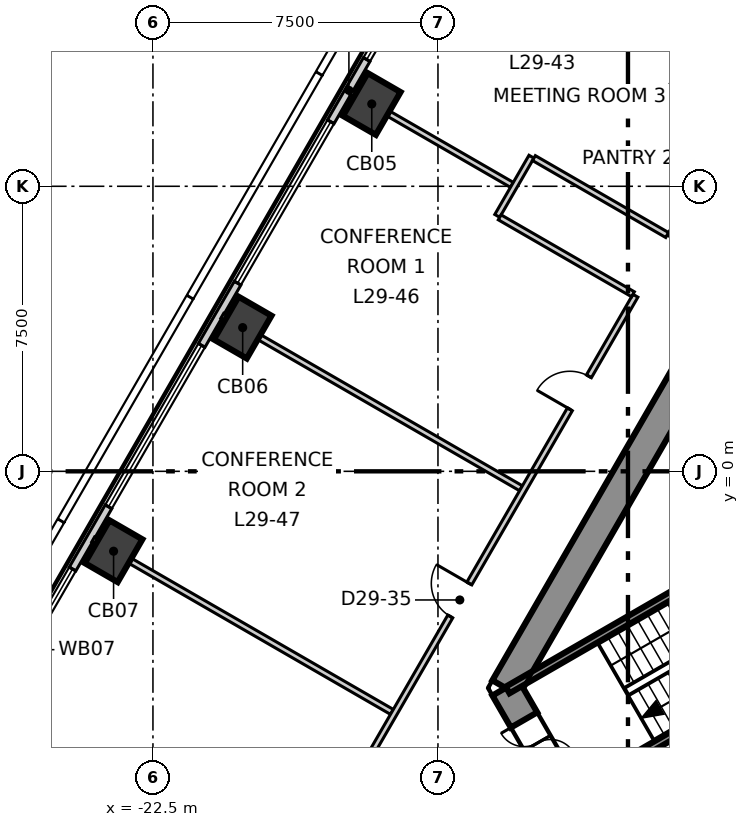
"""IFC4 building model, lengths in metres.
Left out: names, types, materials, properties, quantities, classifications, styles, units other than length and angle.
Written with IfcOpenShell. Run it as: python <this file> out.ifc"""

import sys

from ifc_helpers import new_model, si_unit, direction, frame, frame_2d, origin, origin_2d, place, context, subcontext, project, spatial, polyline, rectangle, outline, extrude, element, fill, save


model = new_model("IFC4")
c1 = context("Model", 3, precision=1e-05, world=origin(), true_north=direction((0.0, 1.0)))
c2 = subcontext(c1, "Body", "Model", "MODEL_VIEW")
j1 = project(units=[si_unit("LENGTHUNIT", "METRE"), si_unit("PLANEANGLEUNIT", "RADIAN")], contexts=[c1])
p1 = place(None, origin())
s1 = spatial("IfcSite", under=j1, at=p1, CompositionType="ELEMENT")
p2 = place(p1, origin())
s2 = spatial("IfcBuilding", under=s1, at=p2, CompositionType="ELEMENT")
p3 = place(p2, frame((0.0, 0.0, 128.3)))
s3 = spatial("IfcBuildingStorey", under=s2, at=p3, CompositionType="ELEMENT", Elevation=128.3)
p4 = place(p3, frame((-1.674, 14.3, -0.3), z_axis=(0.0, 0.0, 1.0), x_axis=(-0.499995765644, -0.866027848477, 0.0)))
e1 = element("IfcWall", 1, at=p4, inside=s3, PredefinedType="SHEAR", context=c2, shape_type="SweptSolid", body=[
    extrude(outline(polyline([(-0.231, -0.4), (1.732, -0.4), (3.695, -0.4), (5.658, -0.4), (7.621, -0.4), (9.584, -0.4), (11.547, -0.4), (13.51, -0.4), (15.473, -0.4), (17.436, -0.4), (19.399, -0.4), (21.362, -0.4), (23.325, -0.4), (22.863, 0.4), (20.977, 0.4), (19.091, 0.4), (17.205, 0.4), (15.319, 0.4), (13.433, 0.4), (11.547, 0.4), (9.661, 0.4), (7.775, 0.4), (5.889, 0.4), (4.003, 0.4), (2.117, 0.4), (0.231, 0.4), (-0.231, -0.4)])), origin(), (0.0, 0.0, 1.0), 4.0),
])
p5 = place(p4, frame((10.997, 0.0, 0.3)))
e2 = element("IfcOpeningElement", 2, at=p5, cuts=e1, PredefinedType="OPENING", context=c2, shape_type="SweptSolid", body=[
    extrude(rectangle(XDim=1.1, YDim=2.1, at=frame_2d((0.55, 1.05))), frame((0.0, 0.41, 0.0), z_axis=(0.0, -1.0, 0.0), x_axis=(1.0, 0.0, 0.0)), (0.0, 0.0, 1.0), 0.82),
])
p6 = place(p4, frame((5.444, 0.0, 0.3)))
e3 = element("IfcOpeningElement", 3, at=p6, cuts=e1, PredefinedType="OPENING", context=c2, shape_type="SweptSolid", body=[
    extrude(rectangle(XDim=0.9, YDim=2.1, at=frame_2d((0.45, 1.05))), frame((0.0, 0.41, 0.0), z_axis=(0.0, -1.0, 0.0), x_axis=(1.0, 0.0, 0.0)), (0.0, 0.0, 1.0), 0.82),
])
p7 = place(p3, frame((-13.221, -5.7, -0.3), z_axis=(0.0, 0.0, 1.0), x_axis=(0.49987182685, -0.866099391942, 0.0)))
e4 = element("IfcWall", 4, at=p7, inside=s3, PredefinedType="SHEAR", context=c2, shape_type="SweptSolid", body=[
    extrude(outline(polyline([(-0.231, -0.4), (1.674, -0.4), (3.579, -0.4), (3.118, 0.4), (1.674, 0.4), (0.231, 0.4), (-0.231, -0.4)])), origin(), (0.0, 0.0, 1.0), 4.0),
])
p8 = place(p7, frame((0.974, 0.0, 0.3)))
e5 = element("IfcOpeningElement", 5, at=p8, cuts=e4, PredefinedType="OPENING", context=c2, shape_type="SweptSolid", body=[
    extrude(rectangle(XDim=1.4, YDim=2.1, at=frame_2d((0.7, 1.05))), frame((0.0, 0.41, 0.0), z_axis=(0.0, -1.0, 0.0), x_axis=(1.0, 0.0, 0.0)), (0.0, 0.0, 1.0), 0.82),
])
for number, where, z_axis, x_axis in (
    (6, (-16.742, 9.666, -0.3), (0.0, 0.0, 1.0), (0.5, 0.866, 0.0)),
    (7, (-20.139, 3.782, -0.3), (0.0, 0.0, 1.0), (0.5, 0.866, 0.0)),
    (8, (-23.536, -2.102, -0.3), (0.0, 0.0, 1.0), (0.5, 0.866, 0.0)),
):
    element("IfcColumn", number, at=place(p3, frame(where, z_axis=z_axis, x_axis=x_axis)), inside=s3, PredefinedType="COLUMN", context=c2, shape_type="SweptSolid", body=[
        extrude(rectangle(XDim=1.3, YDim=1.0, at=origin_2d()), origin(), (0.0, 0.0, 1.0), 4.0),
    ])
p9 = place(p3, frame((-3.109, 34.679, 0.0), z_axis=(0.0, 0.0, 1.0), x_axis=(-0.50000689325, -0.866021423928, 0.0)))
e9 = element("IfcWall", 9, at=p9, inside=s3, PredefinedType="ELEMENTEDWALL", context=c2, shape_type="SweptSolid", body=[
    extrude(rectangle(XDim=56.937, YDim=0.2, at=frame_2d((28.469, 0.0))), origin(), (0.0, 0.0, 1.0), 3.7),
])
p10 = place(p9, frame((2.249, 0.0, 0.9)))
e10 = element("IfcOpeningElement", 10, at=p10, cuts=e9, PredefinedType="OPENING", context=c2, shape_type="SweptSolid", body=[
    extrude(rectangle(XDim=4.9, YDim=2.5, at=frame_2d((2.45, 1.25))), frame((0.0, 0.11, 0.0), z_axis=(0.0, -1.0, 0.0), x_axis=(1.0, 0.0, 0.0)), (0.0, 0.0, 1.0), 0.22),
])
p11 = place(p9, frame((9.043, 0.0, 0.9)))
e11 = element("IfcOpeningElement", 11, at=p11, cuts=e9, PredefinedType="OPENING", context=c2, shape_type="SweptSolid", body=[
    extrude(rectangle(XDim=4.9, YDim=2.5, at=frame_2d((2.45, 1.25))), frame((0.0, 0.11, 0.0), z_axis=(0.0, -1.0, 0.0), x_axis=(1.0, 0.0, 0.0)), (0.0, 0.0, 1.0), 0.22),
])
p12 = place(p9, frame((15.837, 0.0, 0.9)))
e12 = element("IfcOpeningElement", 12, at=p12, cuts=e9, PredefinedType="OPENING", context=c2, shape_type="SweptSolid", body=[
    extrude(rectangle(XDim=4.9, YDim=2.5, at=frame_2d((2.45, 1.25))), frame((0.0, 0.11, 0.0), z_axis=(0.0, -1.0, 0.0), x_axis=(1.0, 0.0, 0.0)), (0.0, 0.0, 1.0), 0.22),
])
p13 = place(p9, frame((22.631, 0.0, 0.9)))
e13 = element("IfcOpeningElement", 13, at=p13, cuts=e9, PredefinedType="OPENING", context=c2, shape_type="SweptSolid", body=[
    extrude(rectangle(XDim=4.9, YDim=2.5, at=frame_2d((2.45, 1.25))), frame((0.0, 0.11, 0.0), z_axis=(0.0, -1.0, 0.0), x_axis=(1.0, 0.0, 0.0)), (0.0, 0.0, 1.0), 0.22),
])
p14 = place(p9, frame((29.425, 0.0, 0.9)))
e14 = element("IfcOpeningElement", 14, at=p14, cuts=e9, PredefinedType="OPENING", context=c2, shape_type="SweptSolid", body=[
    extrude(rectangle(XDim=4.9, YDim=2.5, at=frame_2d((2.45, 1.25))), frame((0.0, 0.11, 0.0), z_axis=(0.0, -1.0, 0.0), x_axis=(1.0, 0.0, 0.0)), (0.0, 0.0, 1.0), 0.22),
])
p15 = place(p9, frame((36.219, 0.0, 0.9)))
e15 = element("IfcOpeningElement", 15, at=p15, cuts=e9, PredefinedType="OPENING", context=c2, shape_type="SweptSolid", body=[
    extrude(rectangle(XDim=4.9, YDim=2.5, at=frame_2d((2.45, 1.25))), frame((0.0, 0.11, 0.0), z_axis=(0.0, -1.0, 0.0), x_axis=(1.0, 0.0, 0.0)), (0.0, 0.0, 1.0), 0.22),
])
p16 = place(p9, frame((43.013, 0.0, 0.9)))
e16 = element("IfcOpeningElement", 16, at=p16, cuts=e9, PredefinedType="OPENING", context=c2, shape_type="SweptSolid", body=[
    extrude(rectangle(XDim=4.9, YDim=2.5, at=frame_2d((2.45, 1.25))), frame((0.0, 0.11, 0.0), z_axis=(0.0, -1.0, 0.0), x_axis=(1.0, 0.0, 0.0)), (0.0, 0.0, 1.0), 0.22),
])
p17 = place(p9, frame((49.807, 0.0, 0.9)))
e17 = element("IfcOpeningElement", 17, at=p17, cuts=e9, PredefinedType="OPENING", context=c2, shape_type="SweptSolid", body=[
    extrude(rectangle(XDim=4.9, YDim=2.5, at=frame_2d((2.45, 1.25))), frame((0.0, 0.11, 0.0), z_axis=(0.0, -1.0, 0.0), x_axis=(1.0, 0.0, 0.0)), (0.0, 0.0, 1.0), 0.22),
])
for number, where, z_axis, x_axis in (
    (18, (-24.073, -1.792, 0.0), (0.0, 0.0, 1.0), (0.866, -0.5, 0.0)),
    (19, (-20.676, 4.092, 0.0), (0.0, 0.0, 1.0), (0.866, -0.5, 0.0)),
):
    element("IfcWall", number, at=place(p3, frame(where, z_axis=z_axis, x_axis=x_axis)), inside=s3, PredefinedType="PARTITIONING", context=c2, shape_type="SweptSolid", body=[
        extrude(rectangle(XDim=9.077, YDim=0.15, at=frame_2d((4.539, 0.0))), origin(), (0.0, 0.0, 1.0), 3.7),
    ])
p18 = place(p3, frame((-18.631, -10.67, 0.0), z_axis=(0.0, 0.0, 1.0), x_axis=(0.499976222121, 0.866039131514, 0.0)))
e20 = element("IfcWall", 20, at=p18, inside=s3, PredefinedType="PARTITIONING", context=c2, shape_type="SweptSolid", body=[
    extrude(rectangle(XDim=17.655, YDim=0.15, at=frame_2d((8.828, 0.0))), origin(), (0.0, 0.0, 1.0), 3.7),
])
p19 = place(p18, frame((14.206, 0.0, 0.0)))
e21 = element("IfcOpeningElement", 21, at=p19, cuts=e20, PredefinedType="OPENING", context=c2, shape_type="SweptSolid", body=[
    extrude(rectangle(XDim=1.0, YDim=2.1, at=frame_2d((0.5, 1.05))), frame((0.0, 0.085, 0.0), z_axis=(0.0, -1.0, 0.0), x_axis=(1.0, 0.0, 0.0)), (0.0, 0.0, 1.0), 0.17),
])
p20 = place(p18, frame((7.912, 0.0, 0.0)))
e22 = element("IfcOpeningElement", 22, at=p20, cuts=e20, PredefinedType="OPENING", context=c2, shape_type="SweptSolid", body=[
    extrude(rectangle(XDim=1.0, YDim=2.1, at=frame_2d((0.5, 1.05))), frame((0.0, 0.085, 0.0), z_axis=(0.0, -1.0, 0.0), x_axis=(1.0, 0.0, 0.0)), (0.0, 0.0, 1.0), 0.17),
])
p21 = place(p18, frame((1.818, 0.0, 0.0)))
e23 = element("IfcOpeningElement", 23, at=p21, cuts=e20, PredefinedType="OPENING", context=c2, shape_type="SweptSolid", body=[
    extrude(rectangle(XDim=1.1, YDim=2.1, at=frame_2d((0.55, 1.05))), frame((0.0, 0.085, 0.0), z_axis=(0.0, -1.0, 0.0), x_axis=(1.0, 0.0, 0.0)), (0.0, 0.0, 1.0), 0.17),
])
p22 = place(p3, frame((-8.903, 6.18, 0.0), z_axis=(0.0, 0.0, 1.0), x_axis=(0.500010074151, 0.866019587393, 0.0)))
e24 = element("IfcWall", 24, at=p22, inside=s3, PredefinedType="PARTITIONING", context=c2, shape_type="SweptSolid", body=[
    extrude(rectangle(XDim=17.806, YDim=0.15, at=frame_2d((8.903, 0.0))), origin(), (0.0, 0.0, 1.0), 3.7),
])
p23 = place(p22, frame((14.756, 0.0, 0.0)))
e25 = element("IfcOpeningElement", 25, at=p23, cuts=e24, PredefinedType="OPENING", context=c2, shape_type="SweptSolid", body=[
    extrude(rectangle(XDim=1.0, YDim=2.1, at=frame_2d((0.5, 1.05))), frame((0.0, 0.085, 0.0), z_axis=(0.0, -1.0, 0.0), x_axis=(1.0, 0.0, 0.0)), (0.0, 0.0, 1.0), 0.17),
])
p24 = place(p22, frame((2.838, 0.0, 0.0)))
e26 = element("IfcOpeningElement", 26, at=p24, cuts=e24, PredefinedType="OPENING", context=c2, shape_type="SweptSolid", body=[
    extrude(rectangle(XDim=1.1, YDim=2.1, at=frame_2d((0.55, 1.05))), frame((0.0, 0.085, 0.0), z_axis=(0.0, -1.0, 0.0), x_axis=(1.0, 0.0, 0.0)), (0.0, 0.0, 1.0), 0.17),
])
p25 = place(p22, frame((10.438, 0.0, 0.0)))
e27 = element("IfcOpeningElement", 27, at=p25, cuts=e24, PredefinedType="OPENING", context=c2, shape_type="SweptSolid", body=[
    extrude(rectangle(XDim=0.9, YDim=2.1, at=frame_2d((0.45, 1.05))), frame((0.0, 0.085, 0.0), z_axis=(0.0, -1.0, 0.0), x_axis=(1.0, 0.0, 0.0)), (0.0, 0.0, 1.0), 0.17),
])
p26 = place(p22, frame((7.438, 0.0, 0.0)))
e28 = element("IfcOpeningElement", 28, at=p26, cuts=e24, PredefinedType="OPENING", context=c2, shape_type="SweptSolid", body=[
    extrude(rectangle(XDim=0.9, YDim=2.1, at=frame_2d((0.45, 1.05))), frame((0.0, 0.085, 0.0), z_axis=(0.0, -1.0, 0.0), x_axis=(1.0, 0.0, 0.0)), (0.0, 0.0, 1.0), 0.17),
])
p27 = place(p3, frame((-17.279, 9.976, 0.0), z_axis=(0.0, 0.0, 1.0), x_axis=(0.866097235509, -0.49987556316, 0.0)))
e29 = element("IfcWall", 29, at=p27, inside=s3, PredefinedType="PARTITIONING", context=c2, shape_type="SweptSolid", body=[
    extrude(rectangle(XDim=4.877, YDim=0.15, at=frame_2d((2.438, 0.0))), origin(), (0.0, 0.0, 1.0), 3.2),
])
p28 = place(p3, frame((-13.44, 6.721, 0.0), z_axis=(0.0, 0.0, 1.0), x_axis=(0.500137434689, 0.865946041288, 0.0)))
e30 = element("IfcWall", 30, at=p28, inside=s3, PredefinedType="PARTITIONING", context=c2, shape_type="SweptSolid", body=[
    extrude(rectangle(XDim=1.799, YDim=0.15, at=frame_2d((0.9, 0.0))), origin(), (0.0, 0.0, 1.0), 3.7),
])
p29 = place(p3, frame((-12.475, 8.242, 0.0), z_axis=(0.0, 0.0, 1.0), x_axis=(0.865955608197, -0.500120870022, 0.0)))
e31 = element("IfcWall", 31, at=p29, inside=s3, PredefinedType="PARTITIONING", context=c2, shape_type="SweptSolid", body=[
    extrude(rectangle(XDim=4.049, YDim=0.15, at=frame_2d((2.024, 0.0))), origin(), (0.0, 0.0, 1.0), 3.7),
])
p30 = place(p3, frame((-13.375, 6.683, 0.0), z_axis=(0.0, 0.0, 1.0), x_axis=(0.866033948129, -0.499985200469, 0.0)))
e32 = element("IfcWall", 32, at=p30, inside=s3, PredefinedType="PARTITIONING", context=c2, shape_type="SweptSolid", body=[
    extrude(rectangle(XDim=4.048, YDim=0.15, at=frame_2d((2.024, 0.0))), origin(), (0.0, 0.0, 1.0), 3.7),
])
p31 = place(p3, frame((-13.167, -5.754, 0.0), z_axis=(0.0, 0.0, 1.0), x_axis=(0.866060938598, 0.499938446846, 0.0)))
e33 = element("IfcWall", 33, at=p31, inside=s3, PredefinedType="SOLIDWALL", context=c2, shape_type="SweptSolid", body=[
    extrude(rectangle(XDim=7.665, YDim=0.2, at=frame_2d((3.832, 0.0))), origin(), (0.0, 0.0, 1.0), 3.7),
])
p32 = place(p3, frame((-11.567, -8.526, 0.0), z_axis=(0.0, 0.0, 1.0), x_axis=(0.866005769735, 0.50003400563, 0.0)))
e34 = element("IfcWall", 34, at=p32, inside=s3, PredefinedType="SOLIDWALL", context=c2, shape_type="SweptSolid", body=[
    extrude(rectangle(XDim=7.665, YDim=0.2, at=frame_2d((3.833, 0.0))), origin(), (0.0, 0.0, 1.0), 3.7),
])
p33 = place(p13, origin())
e35 = element("IfcWindow", 35, at=p33, inside=s3, PartitioningType="SINGLE_PANEL", PredefinedType="WINDOW", context=c2, shape_type="SweptSolid", body=[
    extrude(rectangle(XDim=4.9, YDim=2.5, at=frame_2d((2.45, 1.25))), frame((0.0, 0.03, 0.0), z_axis=(0.0, -1.0, 0.0), x_axis=(1.0, 0.0, 0.0)), (0.0, 0.0, 1.0), 0.06),
])
fill(e13, e35)
p34 = place(p14, origin())
e36 = element("IfcWindow", 36, at=p34, inside=s3, PartitioningType="SINGLE_PANEL", PredefinedType="WINDOW", context=c2, shape_type="SweptSolid", body=[
    extrude(rectangle(XDim=4.9, YDim=2.5, at=frame_2d((2.45, 1.25))), frame((0.0, 0.03, 0.0), z_axis=(0.0, -1.0, 0.0), x_axis=(1.0, 0.0, 0.0)), (0.0, 0.0, 1.0), 0.06),
])
fill(e14, e36)
p35 = place(p15, origin())
e37 = element("IfcWindow", 37, at=p35, inside=s3, PartitioningType="SINGLE_PANEL", PredefinedType="WINDOW", context=c2, shape_type="SweptSolid", body=[
    extrude(rectangle(XDim=4.9, YDim=2.5, at=frame_2d((2.45, 1.25))), frame((0.0, 0.03, 0.0), z_axis=(0.0, -1.0, 0.0), x_axis=(1.0, 0.0, 0.0)), (0.0, 0.0, 1.0), 0.06),
])
fill(e15, e37)
p36 = place(p16, origin())
e38 = element("IfcWindow", 38, at=p36, inside=s3, PartitioningType="SINGLE_PANEL", PredefinedType="WINDOW", context=c2, shape_type="SweptSolid", body=[
    extrude(rectangle(XDim=4.9, YDim=2.5, at=frame_2d((2.45, 1.25))), frame((0.0, 0.03, 0.0), z_axis=(0.0, -1.0, 0.0), x_axis=(1.0, 0.0, 0.0)), (0.0, 0.0, 1.0), 0.06),
])
fill(e16, e38)
p37 = place(p19, origin())
e39 = element("IfcDoor", 39, at=p37, inside=s3, OperationType="SINGLE_SWING_RIGHT", PredefinedType="DOOR", context=c2, shape_type="SweptSolid", body=[
    extrude(rectangle(XDim=1.0, YDim=2.1, at=frame_2d((0.5, 1.05))), frame((0.0, 0.025, 0.0), z_axis=(0.0, -1.0, 0.0), x_axis=(1.0, 0.0, 0.0)), (0.0, 0.0, 1.0), 0.05),
])
fill(e21, e39)
p38 = place(p20, origin())
e40 = element("IfcDoor", 40, at=p38, inside=s3, OperationType="SINGLE_SWING_LEFT", PredefinedType="DOOR", context=c2, shape_type="SweptSolid", body=[
    extrude(rectangle(XDim=1.0, YDim=2.1, at=frame_2d((0.5, 1.05))), frame((0.0, 0.025, 0.0), z_axis=(0.0, -1.0, 0.0), x_axis=(1.0, 0.0, 0.0)), (0.0, 0.0, 1.0), 0.05),
])
fill(e22, e40)
p39 = place(p8, origin())
e41 = element("IfcDoor", 41, at=p39, inside=s3, OperationType="DOUBLE_DOOR_SINGLE_SWING", PredefinedType="DOOR", context=c2, shape_type="SweptSolid", body=[
    extrude(rectangle(XDim=1.4, YDim=2.1, at=frame_2d((0.7, 1.05))), frame((0.0, 0.025, 0.0), z_axis=(0.0, -1.0, 0.0), x_axis=(1.0, 0.0, 0.0)), (0.0, 0.0, 1.0), 0.05),
])
fill(e5, e41)
save(model, sys.argv[1])
